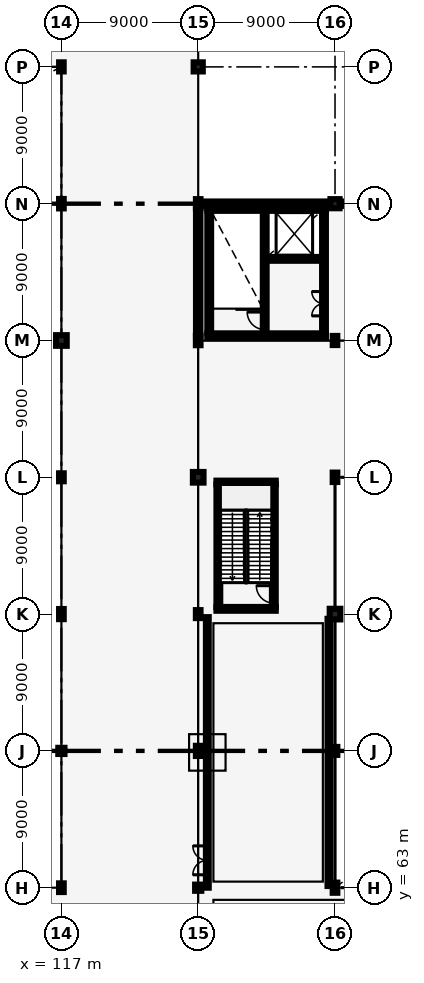
"""IFC4 building model, lengths in metres.
Left out: names, types, materials, properties, quantities, classifications, styles, units other than length and angle.
Written with IfcOpenShell. Run it as: python <this file> out.ifc"""

import sys

from ifc_helpers import new_model, si_unit, direction, frame, frame_2d, origin, origin_2d, place, context, subcontext, project, spatial, rectangle, hollow_circle, i_section, extrude, element, fill, save


model = new_model("IFC4")
c1 = context("Model", 3, precision=1e-05, world=origin(), true_north=direction((0.0, 1.0)))
c2 = subcontext(c1, "Body", "Model", "MODEL_VIEW")
j1 = project(units=[si_unit("LENGTHUNIT", "METRE"), si_unit("PLANEANGLEUNIT", "RADIAN")], contexts=[c1])
p1 = place(None, origin())
s1 = spatial("IfcSite", under=j1, at=p1, CompositionType="ELEMENT")
p2 = place(p1, origin())
s2 = spatial("IfcBuilding", under=s1, at=p2, CompositionType="ELEMENT")
p3 = place(p2, frame((0.0, 0.0, 6.0)))
s3 = spatial("IfcBuildingStorey", under=s2, at=p3, CompositionType="ELEMENT", Elevation=6.0)
p4 = place(p3, frame((117.0, 63.0, 0.0), z_axis=(0.0, 0.0, 1.0), x_axis=(1.0, 0.0, 0.0)))
e1 = element("IfcColumn", 1, at=p4, inside=s3, PredefinedType="COLUMN", context=c2, shape_type="SweptSolid", body=[
    extrude(i_section(OverallWidth=0.306, OverallDepth=0.572, WebThickness=0.021, FlangeThickness=0.04, FilletRadius=0.027, at=origin_2d()), origin(), (0.0, 0.0, 1.0), 6.0),
])
p5 = place(p3, frame((117.0, 72.0, 0.0), z_axis=(0.0, 0.0, 1.0), x_axis=(1.0, 0.0, 0.0)))
e2 = element("IfcColumn", 2, at=p5, inside=s3, PredefinedType="COLUMN", context=c2, shape_type="SweptSolid", body=[
    extrude(hollow_circle(Radius=0.203, WallThickness=0.016, at=origin_2d()), origin(), (0.0, 0.0, 1.0), 6.0),
])
p6 = place(p3, frame((117.0, 81.0, 0.0), z_axis=(0.0, 0.0, 1.0), x_axis=(1.0, 0.0, 0.0)))
e3 = element("IfcColumn", 3, at=p6, inside=s3, PredefinedType="COLUMN", context=c2, shape_type="SweptSolid", body=[
    extrude(i_section(OverallWidth=0.305, OverallDepth=0.668, WebThickness=0.021, FlangeThickness=0.04, FilletRadius=0.027, at=origin_2d()), origin(), (0.0, 0.0, 1.0), 6.0),
])
p7 = place(p3, frame((117.0, 90.0, 0.0), z_axis=(0.0, 0.0, 1.0), x_axis=(1.0, 0.0, 0.0)))
e4 = element("IfcColumn", 4, at=p7, inside=s3, PredefinedType="COLUMN", context=c2, shape_type="SweptSolid", body=[
    extrude(i_section(OverallWidth=0.306, OverallDepth=0.524, WebThickness=0.021, FlangeThickness=0.04, FilletRadius=0.027, at=origin_2d()), origin(), (0.0, 0.0, 1.0), 6.0),
])
p8 = place(p3, frame((117.0, 99.0, 0.0), z_axis=(0.0, 0.0, 1.0), x_axis=(1.0, 0.0, 0.0)))
e5 = element("IfcColumn", 5, at=p8, inside=s3, PredefinedType="COLUMN", context=c2, shape_type="SweptSolid", body=[
    extrude(rectangle(XDim=0.7, YDim=0.7, at=origin_2d()), origin(), (0.0, 0.0, 1.0), 6.0),
])
p9 = place(p3, frame((117.0, 108.0, 0.0), z_axis=(0.0, 0.0, 1.0), x_axis=(1.0, 0.0, 0.0)))
e6 = element("IfcColumn", 6, at=p9, inside=s3, PredefinedType="COLUMN", context=c2, shape_type="SweptSolid", body=[
    extrude(i_section(OverallWidth=0.305, OverallDepth=0.62, WebThickness=0.021, FlangeThickness=0.04, FilletRadius=0.027, at=origin_2d()), origin(), (0.0, 0.0, 1.0), 6.0),
])
p10 = place(p3, frame((117.0, 117.0, 0.0), z_axis=(0.0, 0.0, 1.0), x_axis=(1.0, 0.0, 0.0)))
e7 = element("IfcColumn", 7, at=p10, inside=s3, PredefinedType="COLUMN", context=c2, shape_type="SweptSolid", body=[
    extrude(i_section(OverallWidth=0.3, OverallDepth=0.6, WebThickness=0.015, FlangeThickness=0.03, FilletRadius=0.027, at=origin_2d()), origin(), (0.0, 0.0, 1.0), 6.0),
])
p11 = place(p3, frame((126.0, 63.0, 0.0), z_axis=(0.0, 0.0, 1.0), x_axis=(1.0, 0.0, 0.0)))
e8 = element("IfcColumn", 8, at=p11, inside=s3, PredefinedType="COLUMN", context=c2, shape_type="SweptSolid", body=[
    extrude(hollow_circle(Radius=0.203, WallThickness=0.016, at=origin_2d()), origin(), (0.0, 0.0, 1.0), 6.0),
])
p12 = place(p3, frame((126.0, 72.0, 0.0), z_axis=(0.0, 0.0, 1.0), x_axis=(1.0, 0.0, 0.0)))
e9 = element("IfcColumn", 9, at=p12, inside=s3, PredefinedType="COLUMN", context=c2, shape_type="SweptSolid", body=[
    extrude(i_section(OverallWidth=0.305, OverallDepth=0.668, WebThickness=0.021, FlangeThickness=0.04, FilletRadius=0.027, at=origin_2d()), origin(), (0.0, 0.0, 1.0), 6.0),
])
p13 = place(p3, frame((126.0, 81.0, 0.0), z_axis=(0.0, 0.0, 1.0), x_axis=(1.0, 0.0, 0.0)))
e10 = element("IfcColumn", 10, at=p13, inside=s3, PredefinedType="COLUMN", context=c2, shape_type="SweptSolid", body=[
    extrude(i_section(OverallWidth=0.306, OverallDepth=0.524, WebThickness=0.021, FlangeThickness=0.04, FilletRadius=0.027, at=origin_2d()), origin(), (0.0, 0.0, 1.0), 6.0),
])
p14 = place(p3, frame((126.0, 90.0, 0.0), z_axis=(0.0, 0.0, 1.0), x_axis=(1.0, 0.0, 0.0)))
e11 = element("IfcColumn", 11, at=p14, inside=s3, PredefinedType="COLUMN", context=c2, shape_type="SweptSolid", body=[
    extrude(rectangle(XDim=0.7, YDim=0.7, at=origin_2d()), origin(), (0.0, 0.0, 1.0), 6.0),
])
p15 = place(p3, frame((126.0, 99.0, 0.0), z_axis=(0.0, 0.0, 1.0), x_axis=(1.0, 0.0, 0.0)))
e12 = element("IfcColumn", 12, at=p15, inside=s3, PredefinedType="COLUMN", context=c2, shape_type="SweptSolid", body=[
    extrude(i_section(OverallWidth=0.305, OverallDepth=0.62, WebThickness=0.021, FlangeThickness=0.04, FilletRadius=0.027, at=origin_2d()), origin(), (0.0, 0.0, 1.0), 6.0),
])
p16 = place(p3, frame((126.0, 108.0, 0.0), z_axis=(0.0, 0.0, 1.0), x_axis=(1.0, 0.0, 0.0)))
e13 = element("IfcColumn", 13, at=p16, inside=s3, PredefinedType="COLUMN", context=c2, shape_type="SweptSolid", body=[
    extrude(i_section(OverallWidth=0.3, OverallDepth=0.6, WebThickness=0.015, FlangeThickness=0.03, FilletRadius=0.027, at=origin_2d()), origin(), (0.0, 0.0, 1.0), 6.0),
])
p17 = place(p3, frame((126.0, 117.0, 0.0), z_axis=(0.0, 0.0, 1.0), x_axis=(1.0, 0.0, 0.0)))
e14 = element("IfcColumn", 14, at=p17, inside=s3, PredefinedType="COLUMN", context=c2, shape_type="SweptSolid", body=[
    extrude(rectangle(XDim=0.6, YDim=0.6, at=origin_2d()), origin(), (0.0, 0.0, 1.0), 6.0),
])
p18 = place(p3, frame((135.0, 63.0, 0.0), z_axis=(0.0, 0.0, 1.0), x_axis=(1.0, 0.0, 0.0)))
e15 = element("IfcColumn", 15, at=p18, inside=s3, PredefinedType="COLUMN", context=c2, shape_type="SweptSolid", body=[
    extrude(i_section(OverallWidth=0.305, OverallDepth=0.668, WebThickness=0.021, FlangeThickness=0.04, FilletRadius=0.027, at=origin_2d()), origin(), (0.0, 0.0, 1.0), 6.0),
])
p19 = place(p3, frame((135.0, 72.0, 0.0), z_axis=(0.0, 0.0, 1.0), x_axis=(1.0, 0.0, 0.0)))
e16 = element("IfcColumn", 16, at=p19, inside=s3, PredefinedType="COLUMN", context=c2, shape_type="SweptSolid", body=[
    extrude(i_section(OverallWidth=0.306, OverallDepth=0.524, WebThickness=0.021, FlangeThickness=0.04, FilletRadius=0.027, at=origin_2d()), origin(), (0.0, 0.0, 1.0), 6.0),
])
p20 = place(p3, frame((135.0, 81.0, 0.0), z_axis=(0.0, 0.0, 1.0), x_axis=(1.0, 0.0, 0.0)))
e17 = element("IfcColumn", 17, at=p20, inside=s3, PredefinedType="COLUMN", context=c2, shape_type="SweptSolid", body=[
    extrude(rectangle(XDim=0.7, YDim=0.7, at=origin_2d()), origin(), (0.0, 0.0, 1.0), 6.0),
])
p21 = place(p3, frame((135.0, 90.0, 0.0), z_axis=(0.0, 0.0, 1.0), x_axis=(1.0, 0.0, 0.0)))
e18 = element("IfcColumn", 18, at=p21, inside=s3, PredefinedType="COLUMN", context=c2, shape_type="SweptSolid", body=[
    extrude(i_section(OverallWidth=0.305, OverallDepth=0.62, WebThickness=0.021, FlangeThickness=0.04, FilletRadius=0.027, at=origin_2d()), origin(), (0.0, 0.0, 1.0), 6.0),
])
p22 = place(p3, frame((135.0, 99.0, 0.0), z_axis=(0.0, 0.0, 1.0), x_axis=(1.0, 0.0, 0.0)))
e19 = element("IfcColumn", 19, at=p22, inside=s3, PredefinedType="COLUMN", context=c2, shape_type="SweptSolid", body=[
    extrude(i_section(OverallWidth=0.3, OverallDepth=0.6, WebThickness=0.015, FlangeThickness=0.03, FilletRadius=0.027, at=origin_2d()), origin(), (0.0, 0.0, 1.0), 6.0),
])
p23 = place(p3, frame((135.0, 108.0, 0.0), z_axis=(0.0, 0.0, 1.0), x_axis=(1.0, 0.0, 0.0)))
e20 = element("IfcColumn", 20, at=p23, inside=s3, PredefinedType="COLUMN", context=c2, shape_type="SweptSolid", body=[
    extrude(rectangle(XDim=0.6, YDim=0.6, at=origin_2d()), origin(), (0.0, 0.0, 1.0), 6.0),
])
p24 = place(p3, frame((126.0, 99.305, 0.0), z_axis=(0.0, 0.0, 1.0), x_axis=(0.0, 1.0, 0.0)))
e21 = element("IfcWall", 21, at=p24, inside=s3, PredefinedType="SOLIDWALL", context=c2, shape_type="SweptSolid", body=[
    extrude(rectangle(XDim=8.4, YDim=0.29, at=frame_2d((4.2, 0.0))), origin(), (0.0, 0.0, 1.0), 4.9),
])
p25 = place(p3, frame((126.145, 108.0, 0.0), z_axis=(0.0, 0.0, 1.0), x_axis=(1.0, 0.0, 0.0)))
e22 = element("IfcWall", 22, at=p25, inside=s3, PredefinedType="SOLIDWALL", context=c2, shape_type="SweptSolid", body=[
    extrude(rectangle(XDim=8.56, YDim=0.29, at=frame_2d((4.28, 0.0))), origin(), (0.0, 0.0, 1.0), 4.9),
])
p26 = place(p25, frame((2.655, 0.0, 0.9)))
e23 = element("IfcOpeningElement", 23, at=p26, cuts=e22, PredefinedType="OPENING", context=c2, shape_type="SweptSolid", body=[
    extrude(rectangle(XDim=1.75, YDim=1.45, at=frame_2d((0.875, 0.725))), frame((0.0, 0.155, 0.0), z_axis=(0.0, -1.0, 0.0), x_axis=(1.0, 0.0, 0.0)), (0.0, 0.0, 1.0), 0.31),
])
p27 = place(p3, frame((135.295, 108.0, 0.0), z_axis=(0.0, 0.0, 1.0), x_axis=(1.0, 0.0, 0.0)))
e24 = element("IfcWall", 24, at=p27, inside=s3, PredefinedType="SOLIDWALL", context=c2, shape_type="SweptSolid", body=[
    extrude(rectangle(XDim=8.557, YDim=0.29, at=frame_2d((4.279, 0.0))), origin(), (0.0, 0.0, 1.0), 4.9),
])
p28 = place(p27, frame((2.505, 0.0, 0.9)))
e25 = element("IfcOpeningElement", 25, at=p28, cuts=e24, PredefinedType="OPENING", context=c2, shape_type="SweptSolid", body=[
    extrude(rectangle(XDim=1.55, YDim=1.4, at=frame_2d((0.775, 0.7))), frame((0.0, 0.155, 0.0), z_axis=(0.0, -1.0, 0.0), x_axis=(1.0, 0.0, 0.0)), (0.0, 0.0, 1.0), 0.31),
])
p29 = place(p3, frame((126.725, 99.47, 0.0), z_axis=(0.0, 0.0, 1.0), x_axis=(0.0, 1.0, 0.0)))
e26 = element("IfcWall", 26, at=p29, inside=s3, PredefinedType="SHEAR", context=c2, shape_type="SweptSolid", body=[
    extrude(rectangle(XDim=8.06, YDim=0.25, at=frame_2d((4.03, 0.0))), origin(), (0.0, 0.0, 1.0), 5.64),
])
p30 = place(p3, frame((134.275, 99.47, 0.0), z_axis=(0.0, 0.0, 1.0), x_axis=(0.0, 1.0, 0.0)))
e27 = element("IfcWall", 27, at=p30, inside=s3, PredefinedType="SHEAR", context=c2, shape_type="SweptSolid", body=[
    extrude(rectangle(XDim=8.06, YDim=0.25, at=frame_2d((4.03, 0.0))), origin(), (0.0, 0.0, 1.0), 5.64),
])
p31 = place(p30, frame((1.15, 0.0, 0.0)))
e28 = element("IfcOpeningElement", 28, at=p31, cuts=e27, PredefinedType="OPENING", context=c2, shape_type="SweptSolid", body=[
    extrude(rectangle(XDim=1.6, YDim=2.2, at=frame_2d((0.8, 1.1))), frame((0.0, 0.135, 0.0), z_axis=(0.0, -1.0, 0.0), x_axis=(1.0, 0.0, 0.0)), (0.0, 0.0, 1.0), 0.27),
])
for number, where, z_axis, x_axis in (
    (29, (126.6, 99.345, 0.0), (0.0, 0.0, 1.0), (1.0, 0.0, 0.0)),
    (30, (126.6, 107.655, 0.0), (0.0, 0.0, 1.0), (1.0, 0.0, 0.0)),
):
    element("IfcWall", number, at=place(p3, frame(where, z_axis=z_axis, x_axis=x_axis)), inside=s3, PredefinedType="SHEAR", context=c2, shape_type="SweptSolid", body=[
        extrude(rectangle(XDim=7.8, YDim=0.25, at=frame_2d((3.9, 0.0))), origin(), (0.0, 0.0, 1.0), 5.64),
    ])
p32 = place(p3, frame((130.375, 99.47, 0.0), z_axis=(0.0, 0.0, 1.0), x_axis=(0.0, 1.0, 0.0)))
e31 = element("IfcWall", 31, at=p32, inside=s3, PredefinedType="SHEAR", context=c2, shape_type="SweptSolid", body=[
    extrude(rectangle(XDim=8.06, YDim=0.25, at=frame_2d((4.03, 0.0))), origin(), (0.0, 0.0, 1.0), 5.64),
])
p33 = place(p32, frame((0.25, 0.0, 0.0)))
e32 = element("IfcOpeningElement", 32, at=p33, cuts=e31, PredefinedType="OPENING", context=c2, shape_type="SweptSolid", body=[
    extrude(rectangle(XDim=1.15, YDim=2.15, at=frame_2d((0.575, 1.075))), frame((0.0, 0.135, 0.0), z_axis=(0.0, -1.0, 0.0), x_axis=(1.0, 0.0, 0.0)), (0.0, 0.0, 1.0), 0.27),
])
p34 = place(p3, frame((130.5, 104.37, 0.0), z_axis=(0.0, 0.0, 1.0), x_axis=(1.0, 0.0, 0.0)))
e33 = element("IfcWall", 33, at=p34, inside=s3, PredefinedType="SHEAR", context=c2, shape_type="SweptSolid", body=[
    extrude(rectangle(XDim=3.65, YDim=0.25, at=frame_2d((1.825, 0.0))), origin(), (0.0, 0.0, 1.0), 5.64),
])
p35 = place(p34, frame((0.5, 0.0, 0.0)))
e34 = element("IfcOpeningElement", 34, at=p35, cuts=e33, PredefinedType="OPENING", context=c2, shape_type="SweptSolid", body=[
    extrude(rectangle(XDim=2.2, YDim=2.4, at=frame_2d((1.1, 1.2))), frame((0.0, 0.135, 0.0), z_axis=(0.0, -1.0, 0.0), x_axis=(1.0, 0.0, 0.0)), (0.0, 0.0, 1.0), 0.27),
])
p36 = place(p3, frame((127.325, 81.47, 0.0), z_axis=(0.0, 0.0, 1.0), x_axis=(0.0, 1.0, 0.0)))
e35 = element("IfcWall", 35, at=p36, inside=s3, PredefinedType="SHEAR", context=c2, shape_type="SweptSolid", body=[
    extrude(rectangle(XDim=8.06, YDim=0.25, at=frame_2d((4.03, 0.0))), origin(), (0.0, 0.0, 1.0), 5.64),
])
p37 = place(p3, frame((130.975, 81.47, 0.0), z_axis=(0.0, 0.0, 1.0), x_axis=(0.0, 1.0, 0.0)))
e36 = element("IfcWall", 36, at=p37, inside=s3, PredefinedType="SHEAR", context=c2, shape_type="SweptSolid", body=[
    extrude(rectangle(XDim=8.06, YDim=0.25, at=frame_2d((4.03, 0.0))), origin(), (0.0, 0.0, 1.0), 5.64),
])
p38 = place(p37, frame((0.25, 0.0, 0.0)))
e37 = element("IfcOpeningElement", 37, at=p38, cuts=e36, PredefinedType="OPENING", context=c2, shape_type="SweptSolid", body=[
    extrude(rectangle(XDim=1.15, YDim=2.15, at=frame_2d((0.575, 1.075))), frame((0.0, 0.135, 0.0), z_axis=(0.0, -1.0, 0.0), x_axis=(1.0, 0.0, 0.0)), (0.0, 0.0, 1.0), 0.27),
])
for number, where, z_axis, x_axis in (
    (38, (127.2, 81.345, 0.0), (0.0, 0.0, 1.0), (1.0, 0.0, 0.0)),
    (39, (127.2, 89.655, 0.0), (0.0, 0.0, 1.0), (1.0, 0.0, 0.0)),
):
    element("IfcWall", number, at=place(p3, frame(where, z_axis=z_axis, x_axis=x_axis)), inside=s3, PredefinedType="SHEAR", context=c2, shape_type="SweptSolid", body=[
        extrude(rectangle(XDim=3.9, YDim=0.25, at=frame_2d((1.95, 0.0))), origin(), (0.0, 0.0, 1.0), 5.64),
    ])
p39 = place(p3, frame((126.6, 63.0, 0.0), z_axis=(0.0, 0.0, 1.0), x_axis=(0.0, 1.0, 0.0)))
e40 = element("IfcWall", 40, at=p39, inside=s3, PredefinedType="PARTITIONING", context=c2, shape_type="SweptSolid", body=[
    extrude(rectangle(XDim=17.8, YDim=0.185, at=frame_2d((8.9, 0.0))), origin(), (0.0, 0.0, 1.0), 4.85),
])
p40 = place(p39, frame((0.85, 0.0, 0.0)))
e41 = element("IfcOpeningElement", 41, at=p40, cuts=e40, PredefinedType="OPENING", context=c2, shape_type="SweptSolid", body=[
    extrude(rectangle(XDim=1.9, YDim=2.4, at=frame_2d((0.95, 1.2))), frame((0.0, 0.103, 0.0), z_axis=(0.0, -1.0, 0.0), x_axis=(1.0, 0.0, 0.0)), (0.0, 0.0, 1.0), 0.205),
])
p41 = place(p3, frame((134.6, 63.111, 0.0), z_axis=(0.0, 0.0, 1.0), x_axis=(0.0, 1.0, 0.0)))
e42 = element("IfcWall", 42, at=p41, inside=s3, PredefinedType="PARTITIONING", context=c2, shape_type="SweptSolid", body=[
    extrude(rectangle(XDim=17.578, YDim=0.185, at=frame_2d((8.789, 0.0))), origin(), (0.0, 0.0, 1.0), 4.85),
])
p42 = place(p26, origin())
e43 = element("IfcWindow", 43, at=p42, inside=s3, PartitioningType="SINGLE_PANEL", PredefinedType="WINDOW", context=c2, shape_type="SweptSolid", body=[
    extrude(rectangle(XDim=1.75, YDim=1.45, at=frame_2d((0.875, 0.725))), frame((0.0, 0.03, 0.0), z_axis=(0.0, -1.0, 0.0), x_axis=(1.0, 0.0, 0.0)), (0.0, 0.0, 1.0), 0.06),
])
fill(e23, e43)
p43 = place(p33, origin())
e44 = element("IfcDoor", 44, at=p43, inside=s3, OperationType="SINGLE_SWING_RIGHT", PredefinedType="DOOR", context=c2, shape_type="SweptSolid", body=[
    extrude(rectangle(XDim=1.15, YDim=2.15, at=frame_2d((0.575, 1.075))), frame((0.0, 0.025, 0.0), z_axis=(0.0, -1.0, 0.0), x_axis=(1.0, 0.0, 0.0)), (0.0, 0.0, 1.0), 0.05),
])
fill(e32, e44)
p44 = place(p35, origin())
e45 = element("IfcDoor", 45, at=p44, inside=s3, OperationType="DOUBLE_DOOR_SLIDING", PredefinedType="DOOR", context=c2, shape_type="SweptSolid", body=[
    extrude(rectangle(XDim=2.2, YDim=2.4, at=frame_2d((1.1, 1.2))), frame((0.0, 0.025, 0.0), z_axis=(0.0, -1.0, 0.0), x_axis=(1.0, 0.0, 0.0)), (0.0, 0.0, 1.0), 0.05),
])
fill(e34, e45)
p45 = place(p31, origin())
e46 = element("IfcDoor", 46, at=p45, inside=s3, OperationType="DOUBLE_DOOR_SINGLE_SWING", PredefinedType="DOOR", context=c2, shape_type="SweptSolid", body=[
    extrude(rectangle(XDim=1.6, YDim=2.2, at=frame_2d((0.8, 1.1))), frame((0.0, 0.025, 0.0), z_axis=(0.0, -1.0, 0.0), x_axis=(1.0, 0.0, 0.0)), (0.0, 0.0, 1.0), 0.05),
])
fill(e28, e46)
p46 = place(p38, origin())
e47 = element("IfcDoor", 47, at=p46, inside=s3, OperationType="SINGLE_SWING_RIGHT", PredefinedType="DOOR", context=c2, shape_type="SweptSolid", body=[
    extrude(rectangle(XDim=1.15, YDim=2.15, at=frame_2d((0.575, 1.075))), frame((0.0, 0.025, 0.0), z_axis=(0.0, -1.0, 0.0), x_axis=(1.0, 0.0, 0.0)), (0.0, 0.0, 1.0), 0.05),
])
fill(e37, e47)
p47 = place(p40, origin())
e48 = element("IfcDoor", 48, at=p47, inside=s3, OperationType="DOUBLE_DOOR_SINGLE_SWING", PredefinedType="DOOR", context=c2, shape_type="SweptSolid", body=[
    extrude(rectangle(XDim=1.9, YDim=2.4, at=frame_2d((0.95, 1.2))), frame((0.0, 0.025, 0.0), z_axis=(0.0, -1.0, 0.0), x_axis=(1.0, 0.0, 0.0)), (0.0, 0.0, 1.0), 0.05),
])
fill(e41, e48)
save(model, sys.argv[1])
